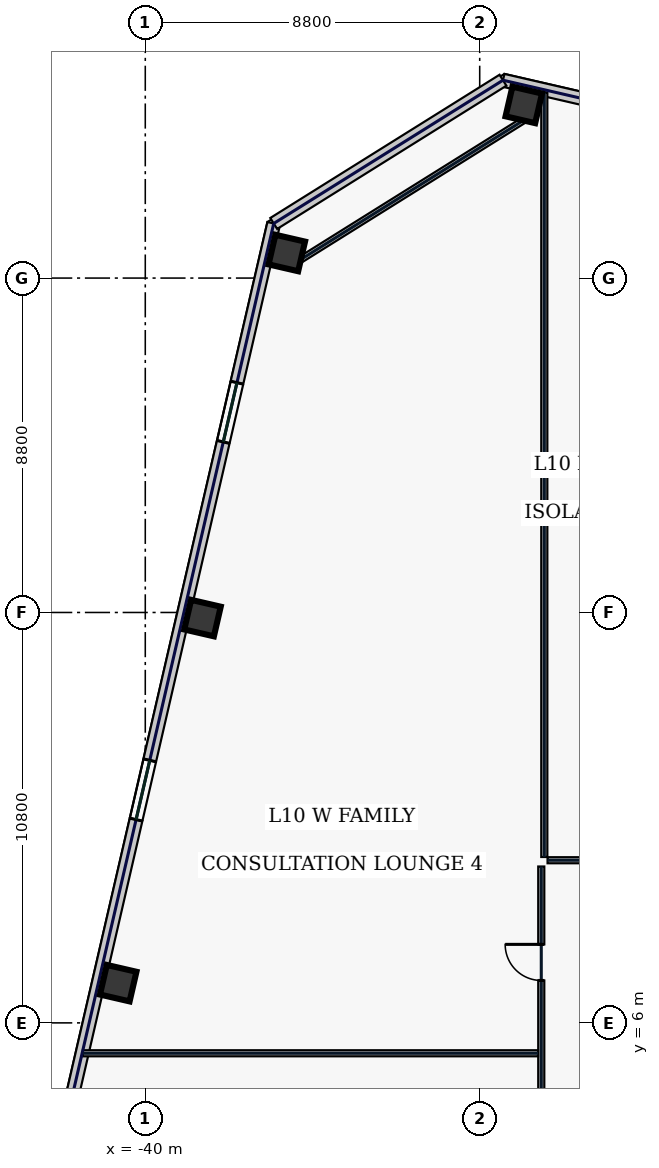
"""IFC4 building model, lengths in metres.
Left out: names, types, materials, properties, quantities, classifications, styles, units other than length and angle.
Written with IfcOpenShell. Run it as: python <this file> out.ifc"""

import sys

from ifc_helpers import new_model, si_unit, direction, frame, frame_2d, origin, origin_2d, place, context, subcontext, project, spatial, rectangle, hollow_rectangle, extrude, element, fill, save


model = new_model("IFC4")
c1 = context("Model", 3, precision=1e-05, world=origin(), true_north=direction((0.0, 1.0)))
c2 = subcontext(c1, "Body", "Model", "MODEL_VIEW")
j1 = project(units=[si_unit("LENGTHUNIT", "METRE"), si_unit("PLANEANGLEUNIT", "RADIAN")], contexts=[c1])
p1 = place(None, origin())
s1 = spatial("IfcSite", under=j1, at=p1, CompositionType="ELEMENT")
p2 = place(p1, origin())
s2 = spatial("IfcBuilding", under=s1, at=p2, CompositionType="ELEMENT")
p3 = place(p2, frame((0.0, 0.0, 51.4)))
s3 = spatial("IfcBuildingStorey", under=s2, at=p3, CompositionType="ELEMENT", Elevation=51.4)
for number, where, z_axis, x_axis in (
    (1, (-30.04, 30.156, 0.0), (0.0, 0.0, 1.0), (0.974, -0.225, 0.0)),
    (2, (-36.276, 26.26, 0.0), (0.0, 0.0, 1.0), (0.974, -0.225, 0.0)),
    (3, (-38.494, 16.652, 0.0), (0.0, 0.0, 1.0), (0.974, -0.225, 0.0)),
    (4, (-40.712, 7.045, 0.0), (0.0, 0.0, 1.0), (0.974, -0.225, 0.0)),
):
    element("IfcColumn", number, at=place(p3, frame(where, z_axis=z_axis, x_axis=x_axis)), inside=s3, PredefinedType="COLUMN", context=c2, shape_type="SweptSolid", body=[
        extrude(hollow_rectangle(XDim=0.8, YDim=0.8, WallThickness=0.036, at=origin_2d()), origin(), (0.0, 0.0, 1.0), 3.74),
    ])
p4 = place(p3, frame((-8.517, 25.711, 0.0), z_axis=(0.0, 0.0, 1.0), x_axis=(-0.974372845456, 0.224939009598, 0.0)))
e5 = element("IfcWall", 5, at=p4, inside=s3, PredefinedType="STANDARD", context=c2, shape_type="SweptSolid", body=[
    extrude(rectangle(XDim=22.652, YDim=0.34, at=frame_2d((11.326, 0.0))), origin(), (0.0, 0.0, 1.0), 3.74),
])
p5 = place(p4, frame((18.189, 0.0, 0.77)))
e6 = element("IfcOpeningElement", 6, at=p5, cuts=e5, PredefinedType="OPENING", context=c2, shape_type="SweptSolid", body=[
    extrude(rectangle(XDim=2.3, YDim=2.1, at=frame_2d((1.15, 1.05))), frame((0.0, 0.18, 0.0), z_axis=(0.0, -1.0, 0.0), x_axis=(1.0, 0.0, 0.0)), (0.0, 0.0, 1.0), 0.36),
])
p6 = place(p4, frame((13.705, 0.0, 0.77)))
e7 = element("IfcOpeningElement", 7, at=p6, cuts=e5, PredefinedType="OPENING", context=c2, shape_type="SweptSolid", body=[
    extrude(rectangle(XDim=2.3, YDim=2.1, at=frame_2d((1.15, 1.05))), frame((0.0, 0.18, 0.0), z_axis=(0.0, -1.0, 0.0), x_axis=(1.0, 0.0, 0.0)), (0.0, 0.0, 1.0), 0.36),
])
p7 = place(p4, frame((8.441, 0.0, 0.77)))
e8 = element("IfcOpeningElement", 8, at=p7, cuts=e5, PredefinedType="OPENING", context=c2, shape_type="SweptSolid", body=[
    extrude(rectangle(XDim=0.85, YDim=1.85, at=frame_2d((0.425, 0.925))), frame((0.0, 0.18, 0.0), z_axis=(0.0, -1.0, 0.0), x_axis=(1.0, 0.0, 0.0)), (0.0, 0.0, 1.0), 0.36),
])
p8 = place(p4, frame((3.956, 0.0, 0.77)))
e9 = element("IfcOpeningElement", 9, at=p8, cuts=e5, PredefinedType="OPENING", context=c2, shape_type="SweptSolid", body=[
    extrude(rectangle(XDim=0.85, YDim=1.85, at=frame_2d((0.425, 0.925))), frame((0.0, 0.18, 0.0), z_axis=(0.0, -1.0, 0.0), x_axis=(1.0, 0.0, 0.0)), (0.0, 0.0, 1.0), 0.36),
])
p9 = place(p3, frame((-36.62, 27.037, 0.0), z_axis=(0.0, 0.0, 1.0), x_axis=(-0.224951280646, -0.974370012539, 0.0)))
e10 = element("IfcWall", 10, at=p9, inside=s3, PredefinedType="STANDARD", context=c2, shape_type="SweptSolid", body=[
    extrude(rectangle(XDim=40.8, YDim=0.34, at=frame_2d((20.4, 0.0))), origin(), (0.0, 0.0, 1.0), 3.74),
])
p10 = place(p9, frame((4.3, 0.0, 0.58)))
e11 = element("IfcOpeningElement", 11, at=p10, cuts=e10, PredefinedType="OPENING", context=c2, shape_type="SweptSolid", body=[
    extrude(rectangle(XDim=1.6, YDim=2.3, at=frame_2d((0.8, 1.15))), frame((0.0, 0.18, 0.0), z_axis=(0.0, -1.0, 0.0), x_axis=(1.0, 0.0, 0.0)), (0.0, 0.0, 1.0), 0.36),
])
p11 = place(p9, frame((14.5, 0.0, 0.58)))
e12 = element("IfcOpeningElement", 12, at=p11, cuts=e10, PredefinedType="OPENING", context=c2, shape_type="SweptSolid", body=[
    extrude(rectangle(XDim=1.6, YDim=2.3, at=frame_2d((0.8, 1.15))), frame((0.0, 0.18, 0.0), z_axis=(0.0, -1.0, 0.0), x_axis=(1.0, 0.0, 0.0)), (0.0, 0.0, 1.0), 0.36),
])
p12 = place(p9, frame((24.7, 0.0, 0.58)))
e13 = element("IfcOpeningElement", 13, at=p12, cuts=e10, PredefinedType="OPENING", context=c2, shape_type="SweptSolid", body=[
    extrude(rectangle(XDim=1.6, YDim=2.3, at=frame_2d((0.8, 1.15))), frame((0.0, 0.18, 0.0), z_axis=(0.0, -1.0, 0.0), x_axis=(1.0, 0.0, 0.0)), (0.0, 0.0, 1.0), 0.36),
])
p13 = place(p9, frame((34.9, 0.0, 0.58)))
e14 = element("IfcOpeningElement", 14, at=p13, cuts=e10, PredefinedType="OPENING", context=c2, shape_type="SweptSolid", body=[
    extrude(rectangle(XDim=1.6, YDim=2.3, at=frame_2d((0.8, 1.15))), frame((0.0, 0.18, 0.0), z_axis=(0.0, -1.0, 0.0), x_axis=(1.0, 0.0, 0.0)), (0.0, 0.0, 1.0), 0.36),
])
p14 = place(p3, frame((-30.588, 30.807, 0.0), z_axis=(0.0, 0.0, 1.0), x_axis=(-0.848031080615, -0.529946493819, 0.0)))
e15 = element("IfcWall", 15, at=p14, inside=s3, PredefinedType="STANDARD", context=c2, shape_type="SweptSolid", body=[
    extrude(rectangle(XDim=7.114, YDim=0.34, at=frame_2d((3.557, 0.0))), origin(), (0.0, 0.0, 1.0), 3.74),
])
p15 = place(p3, frame((-29.86, 29.868, 0.0), z_axis=(0.0, 0.0, 1.0), x_axis=(-0.848043064089, -0.529927317139, 0.0)))
e16 = element("IfcWall", 16, at=p15, inside=s3, PredefinedType="PARTITIONING", context=c2, shape_type="SweptSolid", body=[
    extrude(rectangle(XDim=7.354, YDim=0.16, at=frame_2d((3.677, 0.0))), origin(), (0.0, 0.0, 1.0), 3.74),
])
p16 = place(p3, frame((-29.58, -10.015, 0.0), z_axis=(0.0, 0.0, 1.0), x_axis=(0.0, 1.0, 0.0)))
e17 = element("IfcWall", 17, at=p16, inside=s3, PredefinedType="PARTITIONING", context=c2, shape_type="SweptSolid", body=[
    extrude(rectangle(XDim=20.13, YDim=0.16, at=frame_2d((10.065, 0.0))), origin(), (0.0, 0.0, 1.0), 3.74),
])
p17 = place(p16, frame((2.169, 0.0, 0.0)))
e18 = element("IfcOpeningElement", 18, at=p17, cuts=e17, PredefinedType="OPENING", context=c2, shape_type="SweptSolid", body=[
    extrude(rectangle(XDim=0.95, YDim=2.2, at=frame_2d((0.475, 1.1))), frame((0.0, 0.09, 0.0), z_axis=(0.0, -1.0, 0.0), x_axis=(1.0, 0.0, 0.0)), (0.0, 0.0, 1.0), 0.18),
])
p18 = place(p16, frame((6.4, 0.0, 0.0)))
e19 = element("IfcOpeningElement", 19, at=p18, cuts=e17, PredefinedType="OPENING", context=c2, shape_type="SweptSolid", body=[
    extrude(rectangle(XDim=0.95, YDim=2.2, at=frame_2d((0.475, 1.1))), frame((0.0, 0.09, 0.0), z_axis=(0.0, -1.0, 0.0), x_axis=(1.0, 0.0, 0.0)), (0.0, 0.0, 1.0), 0.18),
])
p19 = place(p16, frame((11.6, 0.0, 0.0)))
e20 = element("IfcOpeningElement", 20, at=p19, cuts=e17, PredefinedType="OPENING", context=c2, shape_type="SweptSolid", body=[
    extrude(rectangle(XDim=0.95, YDim=2.2, at=frame_2d((0.475, 1.1))), frame((0.0, 0.09, 0.0), z_axis=(0.0, -1.0, 0.0), x_axis=(1.0, 0.0, 0.0)), (0.0, 0.0, 1.0), 0.18),
])
p20 = place(p16, frame((17.131, 0.0, 0.0)))
e21 = element("IfcOpeningElement", 21, at=p20, cuts=e17, PredefinedType="OPENING", context=c2, shape_type="SweptSolid", body=[
    extrude(rectangle(XDim=0.95, YDim=2.2, at=frame_2d((0.475, 1.1))), frame((0.0, 0.09, 0.0), z_axis=(0.0, -1.0, 0.0), x_axis=(1.0, 0.0, 0.0)), (0.0, 0.0, 1.0), 0.18),
])
p21 = place(p3, frame((-29.415, 10.28, 0.0), z_axis=(0.0, 0.0, 1.0), x_axis=(1.0, 0.0, 0.0)))
e22 = element("IfcWall", 22, at=p21, inside=s3, PredefinedType="PARTITIONING", context=c2, shape_type="SweptSolid", body=[
    extrude(rectangle(XDim=58.83, YDim=0.16, at=frame_2d((29.415, 0.0))), origin(), (0.0, 0.0, 1.0), 3.74),
])
p22 = place(p21, frame((1.869, 0.0, 0.0)))
e23 = element("IfcOpeningElement", 23, at=p22, cuts=e22, PredefinedType="OPENING", context=c2, shape_type="SweptSolid", body=[
    extrude(rectangle(XDim=1.3, YDim=2.2, at=frame_2d((0.65, 1.1))), frame((0.0, 0.09, 0.0), z_axis=(0.0, -1.0, 0.0), x_axis=(1.0, 0.0, 0.0)), (0.0, 0.0, 1.0), 0.18),
])
p23 = place(p21, frame((6.897, 0.0, 0.0)))
e24 = element("IfcOpeningElement", 24, at=p23, cuts=e22, PredefinedType="OPENING", context=c2, shape_type="SweptSolid", body=[
    extrude(rectangle(XDim=1.3, YDim=2.2, at=frame_2d((0.65, 1.1))), frame((0.0, 0.09, 0.0), z_axis=(0.0, -1.0, 0.0), x_axis=(1.0, 0.0, 0.0)), (0.0, 0.0, 1.0), 0.18),
])
p24 = place(p21, frame((12.417, 0.0, 0.0)))
e25 = element("IfcOpeningElement", 25, at=p24, cuts=e22, PredefinedType="OPENING", context=c2, shape_type="SweptSolid", body=[
    extrude(rectangle(XDim=0.95, YDim=2.2, at=frame_2d((0.475, 1.1))), frame((0.0, 0.09, 0.0), z_axis=(0.0, -1.0, 0.0), x_axis=(1.0, 0.0, 0.0)), (0.0, 0.0, 1.0), 0.18),
])
p25 = place(p21, frame((18.545, 0.0, 0.0)))
e26 = element("IfcOpeningElement", 26, at=p25, cuts=e22, PredefinedType="OPENING", context=c2, shape_type="SweptSolid", body=[
    extrude(rectangle(XDim=0.95, YDim=2.2, at=frame_2d((0.475, 1.1))), frame((0.0, 0.09, 0.0), z_axis=(0.0, -1.0, 0.0), x_axis=(1.0, 0.0, 0.0)), (0.0, 0.0, 1.0), 0.18),
])
p26 = place(p21, frame((26.35, 0.0, 0.0)))
e27 = element("IfcOpeningElement", 27, at=p26, cuts=e22, PredefinedType="OPENING", context=c2, shape_type="SweptSolid", body=[
    extrude(rectangle(XDim=1.3, YDim=2.2, at=frame_2d((0.65, 1.1))), frame((0.0, 0.09, 0.0), z_axis=(0.0, -1.0, 0.0), x_axis=(1.0, 0.0, 0.0)), (0.0, 0.0, 1.0), 0.18),
])
p27 = place(p21, frame((35.125, 0.0, 0.0)))
e28 = element("IfcOpeningElement", 28, at=p27, cuts=e22, PredefinedType="OPENING", context=c2, shape_type="SweptSolid", body=[
    extrude(rectangle(XDim=0.95, YDim=2.2, at=frame_2d((0.475, 1.1))), frame((0.0, 0.09, 0.0), z_axis=(0.0, -1.0, 0.0), x_axis=(1.0, 0.0, 0.0)), (0.0, 0.0, 1.0), 0.18),
])
p28 = place(p21, frame((43.625, 0.0, 0.0)))
e29 = element("IfcOpeningElement", 29, at=p28, cuts=e22, PredefinedType="OPENING", context=c2, shape_type="SweptSolid", body=[
    extrude(rectangle(XDim=0.95, YDim=2.2, at=frame_2d((0.475, 1.1))), frame((0.0, 0.09, 0.0), z_axis=(0.0, -1.0, 0.0), x_axis=(1.0, 0.0, 0.0)), (0.0, 0.0, 1.0), 0.18),
])
p29 = place(p21, frame((50.85, 0.0, 0.0)))
e30 = element("IfcOpeningElement", 30, at=p29, cuts=e22, PredefinedType="OPENING", context=c2, shape_type="SweptSolid", body=[
    extrude(rectangle(XDim=1.15, YDim=2.2, at=frame_2d((0.575, 1.1))), frame((0.0, 0.09, 0.0), z_axis=(0.0, -1.0, 0.0), x_axis=(1.0, 0.0, 0.0)), (0.0, 0.0, 1.0), 0.18),
])
p30 = place(p21, frame((55.831, 0.0, 0.0)))
e31 = element("IfcOpeningElement", 31, at=p30, cuts=e22, PredefinedType="OPENING", context=c2, shape_type="SweptSolid", body=[
    extrude(rectangle(XDim=1.3, YDim=2.2, at=frame_2d((0.65, 1.1))), frame((0.0, 0.09, 0.0), z_axis=(0.0, -1.0, 0.0), x_axis=(1.0, 0.0, 0.0)), (0.0, 0.0, 1.0), 0.18),
])
p31 = place(p3, frame((-29.5, 10.365, 0.0), z_axis=(0.0, 0.0, 1.0), x_axis=(0.0, 1.0, 0.0)))
e32 = element("IfcWall", 32, at=p31, inside=s3, PredefinedType="PARTITIONING", context=c2, shape_type="SweptSolid", body=[
    extrude(rectangle(XDim=20.119, YDim=0.16, at=frame_2d((10.059, 0.0))), origin(), (0.0, 0.0, 1.0), 3.74),
])
p32 = place(p3, frame((-41.641, 5.2, 0.0), z_axis=(0.0, 0.0, 1.0), x_axis=(1.0, 0.0, 0.0)))
e33 = element("IfcWall", 33, at=p32, inside=s3, PredefinedType="PARTITIONING", context=c2, shape_type="SweptSolid", body=[
    extrude(rectangle(XDim=11.976, YDim=0.16, at=frame_2d((5.988, 0.0))), origin(), (0.0, 0.0, 1.0), 3.74),
])
p33 = place(p10, origin())
e34 = element("IfcWindow", 34, at=p33, inside=s3, PartitioningType="SINGLE_PANEL", PredefinedType="WINDOW", context=c2, shape_type="SweptSolid", body=[
    extrude(rectangle(XDim=1.6, YDim=2.3, at=frame_2d((0.8, 1.15))), frame((0.0, 0.03, 0.0), z_axis=(0.0, -1.0, 0.0), x_axis=(1.0, 0.0, 0.0)), (0.0, 0.0, 1.0), 0.06),
])
fill(e11, e34)
p34 = place(p11, origin())
e35 = element("IfcWindow", 35, at=p34, inside=s3, PartitioningType="SINGLE_PANEL", PredefinedType="WINDOW", context=c2, shape_type="SweptSolid", body=[
    extrude(rectangle(XDim=1.6, YDim=2.3, at=frame_2d((0.8, 1.15))), frame((0.0, 0.03, 0.0), z_axis=(0.0, -1.0, 0.0), x_axis=(1.0, 0.0, 0.0)), (0.0, 0.0, 1.0), 0.06),
])
fill(e12, e35)
p35 = place(p20, origin())
e36 = element("IfcDoor", 36, at=p35, inside=s3, OperationType="SINGLE_SWING_RIGHT", PredefinedType="DOOR", context=c2, shape_type="SweptSolid", body=[
    extrude(rectangle(XDim=0.95, YDim=2.2, at=frame_2d((0.475, 1.1))), frame((0.0, 0.025, 0.0), z_axis=(0.0, -1.0, 0.0), x_axis=(1.0, 0.0, 0.0)), (0.0, 0.0, 1.0), 0.05),
])
fill(e21, e36)
save(model, sys.argv[1])
